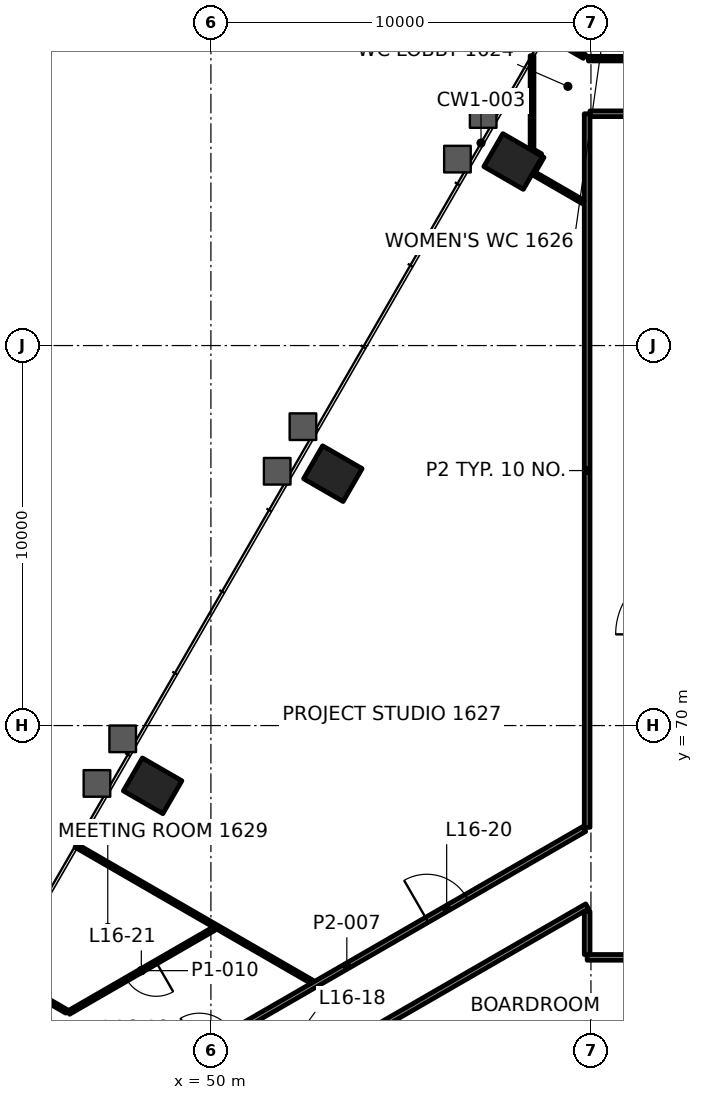
"""IFC4 building model, lengths in metres.
Left out: names, types, materials, properties, quantities, classifications, styles, units other than length and angle.
Written with IfcOpenShell. Run it as: python <this file> out.ifc"""

import sys

from ifc_helpers import new_model, si_unit, direction, frame, frame_2d, origin, origin_2d, place, context, subcontext, project, spatial, rectangle, extrude, element, fill, save


model = new_model("IFC4")
c1 = context("Model", 3, precision=1e-05, world=origin(), true_north=direction((0.0, 1.0)))
c2 = subcontext(c1, "Body", "Model", "MODEL_VIEW")
j1 = project(units=[si_unit("LENGTHUNIT", "METRE"), si_unit("PLANEANGLEUNIT", "RADIAN")], contexts=[c1])
p1 = place(None, origin())
s1 = spatial("IfcSite", under=j1, at=p1, CompositionType="ELEMENT")
p2 = place(p1, origin())
s2 = spatial("IfcBuilding", under=s1, at=p2, CompositionType="ELEMENT")
p3 = place(p2, frame((0.0, 0.0, 73.6)))
s3 = spatial("IfcBuildingStorey", under=s2, at=p3, CompositionType="ELEMENT", Elevation=73.6)
for number, where, z_axis, x_axis in (
    (1, (57.951, 84.843, -0.0), (0.0, 0.0, 1.0), (-0.5, -0.866, 0.0)),
    (2, (53.209, 76.628, -0.0), (0.0, 0.0, 1.0), (-0.5, -0.866, 0.0)),
    (3, (48.466, 68.414, -0.0), (0.0, 0.0, 1.0), (-0.5, -0.866, 0.0)),
):
    element("IfcColumn", number, at=place(p3, frame(where, z_axis=z_axis, x_axis=x_axis)), inside=s3, PredefinedType="COLUMN", context=c2, shape_type="SweptSolid", body=[
        extrude(rectangle(XDim=1.0, YDim=1.2, at=origin_2d()), origin(), (0.0, 0.0, 1.0), 4.2),
    ])
p4 = place(p3, frame((90.099, 63.9, 0.0), z_axis=(0.0, 0.0, 1.0), x_axis=(-1.0, 0.0, 0.0)))
e4 = element("IfcWall", 4, at=p4, inside=s3, PredefinedType="PARTITIONING", context=c2, shape_type="SweptSolid", body=[
    extrude(rectangle(XDim=30.199, YDim=0.15, at=frame_2d((15.1, 0.0))), origin(), (0.0, 0.0, 1.0), 3.4),
])
p5 = place(p4, frame((2.309, 0.0, 0.0)))
e5 = element("IfcOpeningElement", 5, at=p5, cuts=e4, PredefinedType="OPENING", context=c2, shape_type="SweptSolid", body=[
    extrude(rectangle(XDim=1.2, YDim=2.1, at=frame_2d((0.6, 1.05))), frame((0.0, 0.085, 0.0), z_axis=(0.0, -1.0, 0.0), x_axis=(1.0, 0.0, 0.0)), (0.0, 0.0, 1.0), 0.17),
])
p6 = place(p4, frame((14.599, 0.0, 0.0)))
e6 = element("IfcOpeningElement", 6, at=p6, cuts=e4, PredefinedType="OPENING", context=c2, shape_type="SweptSolid", body=[
    extrude(rectangle(XDim=1.0, YDim=2.1, at=frame_2d((0.5, 1.05))), frame((0.0, 0.085, 0.0), z_axis=(0.0, -1.0, 0.0), x_axis=(1.0, 0.0, 0.0)), (0.0, 0.0, 1.0), 0.17),
])
p7 = place(p4, frame((26.791, 0.0, 0.0)))
e7 = element("IfcOpeningElement", 7, at=p7, cuts=e4, PredefinedType="OPENING", context=c2, shape_type="SweptSolid", body=[
    extrude(rectangle(XDim=1.0, YDim=2.1, at=frame_2d((0.5, 1.05))), frame((0.0, 0.085, 0.0), z_axis=(0.0, -1.0, 0.0), x_axis=(1.0, 0.0, 0.0)), (0.0, 0.0, 1.0), 0.17),
])
p8 = place(p3, frame((59.976, 86.1, 0.0), z_axis=(0.0, 0.0, 1.0), x_axis=(1.0, 0.0, 0.0)))
e8 = element("IfcWall", 8, at=p8, inside=s3, PredefinedType="PARTITIONING", context=c2, shape_type="SweptSolid", body=[
    extrude(rectangle(XDim=9.649, YDim=0.15, at=frame_2d((4.825, 0.0))), origin(), (0.0, 0.0, 1.0), 3.4),
])
p9 = place(p8, frame((4.225, 0.0, 0.0)))
e9 = element("IfcOpeningElement", 9, at=p9, cuts=e8, PredefinedType="OPENING", context=c2, shape_type="SweptSolid", body=[
    extrude(rectangle(XDim=1.2, YDim=2.1, at=frame_2d((0.6, 1.05))), frame((0.0, 0.085, 0.0), z_axis=(0.0, -1.0, 0.0), x_axis=(1.0, 0.0, 0.0)), (0.0, 0.0, 1.0), 0.17),
])
p10 = place(p3, frame((67.181, 87.55, 0.0), z_axis=(0.0, 0.0, 1.0), x_axis=(-1.0, 0.0, 0.0)))
e10 = element("IfcWall", 10, at=p10, inside=s3, PredefinedType="PARTITIONING", context=c2, shape_type="SweptSolid", body=[
    extrude(rectangle(XDim=7.249, YDim=0.12, at=frame_2d((3.625, 0.0))), origin(), (0.0, 0.0, 1.0), 3.4),
])
p11 = place(p10, frame((1.388, 0.0, 0.0)))
e11 = element("IfcOpeningElement", 11, at=p11, cuts=e10, PredefinedType="OPENING", context=c2, shape_type="SweptSolid", body=[
    extrude(rectangle(XDim=0.9, YDim=2.1, at=frame_2d((0.45, 1.05))), frame((0.0, 0.07, 0.0), z_axis=(0.0, -1.0, 0.0), x_axis=(1.0, 0.0, 0.0)), (0.0, 0.0, 1.0), 0.14),
])
p12 = place(p10, frame((4.807, 0.0, 0.0)))
e12 = element("IfcOpeningElement", 12, at=p12, cuts=e10, PredefinedType="OPENING", context=c2, shape_type="SweptSolid", body=[
    extrude(rectangle(XDim=0.9, YDim=2.1, at=frame_2d((0.45, 1.05))), frame((0.0, 0.07, 0.0), z_axis=(0.0, -1.0, 0.0), x_axis=(1.0, 0.0, 0.0)), (0.0, 0.0, 1.0), 0.14),
])
p13 = place(p3, frame((59.9, 65.243, 0.0), z_axis=(0.0, 0.0, 1.0), x_axis=(-0.866023326939, -0.500003597184, 0.0)))
e13 = element("IfcWall", 13, at=p13, inside=s3, PredefinedType="PARTITIONING", context=c2, shape_type="SweptSolid", body=[
    extrude(rectangle(XDim=13.48, YDim=0.15, at=frame_2d((6.74, 0.0))), origin(), (0.0, 0.0, 1.0), 3.247),
])
p14 = place(p13, frame((9.643, 0.0, 0.0)))
e14 = element("IfcOpeningElement", 14, at=p14, cuts=e13, PredefinedType="OPENING", context=c2, shape_type="SweptSolid", body=[
    extrude(rectangle(XDim=1.2, YDim=2.1, at=frame_2d((0.6, 1.05))), frame((0.0, 0.085, 0.0), z_axis=(0.0, -1.0, 0.0), x_axis=(1.0, 0.0, 0.0)), (0.0, 0.0, 1.0), 0.17),
])
p15 = place(p3, frame((47.328, 60.063, 0.0), z_axis=(0.0, 0.0, 1.0), x_axis=(0.86602527873, 0.500000216601, 0.0)))
e15 = element("IfcWall", 15, at=p15, inside=s3, PredefinedType="PARTITIONING", context=c2, shape_type="SweptSolid", body=[
    extrude(rectangle(XDim=14.431, YDim=0.15, at=frame_2d((7.215, 0.0))), origin(), (0.0, 0.0, 1.0), 3.4),
])
p16 = place(p15, frame((2.737, 0.0, 0.0)))
e16 = element("IfcOpeningElement", 16, at=p16, cuts=e15, PredefinedType="OPENING", context=c2, shape_type="SweptSolid", body=[
    extrude(rectangle(XDim=1.0, YDim=2.1, at=frame_2d((0.5, 1.05))), frame((0.0, 0.085, 0.0), z_axis=(0.0, -1.0, 0.0), x_axis=(1.0, 0.0, 0.0)), (0.0, 0.0, 1.0), 0.17),
])
p17 = place(p15, frame((9.649, 0.0, 0.0)))
e17 = element("IfcOpeningElement", 17, at=p17, cuts=e15, PredefinedType="OPENING", context=c2, shape_type="SweptSolid", body=[
    extrude(rectangle(XDim=1.2, YDim=2.1, at=frame_2d((0.6, 1.05))), frame((0.0, 0.085, 0.0), z_axis=(0.0, -1.0, 0.0), x_axis=(1.0, 0.0, 0.0)), (0.0, 0.0, 1.0), 0.17),
])
p18 = place(p3, frame((50.082, 64.655, 0.0), z_axis=(0.0, 0.0, 1.0), x_axis=(-0.866030989016, -0.499990325971, 0.0)))
e18 = element("IfcWall", 18, at=p18, inside=s3, PredefinedType="PARTITIONING", context=c2, shape_type="SweptSolid", body=[
    extrude(rectangle(XDim=4.418, YDim=0.1, at=frame_2d((2.209, 0.0))), origin(), (0.0, 0.0, 1.0), 3.4),
])
p19 = place(p18, frame((1.759, 0.0, 0.0)))
e19 = element("IfcOpeningElement", 19, at=p19, cuts=e18, PredefinedType="OPENING", context=c2, shape_type="SweptSolid", body=[
    extrude(rectangle(XDim=0.9, YDim=2.1, at=frame_2d((0.45, 1.05))), frame((0.0, 0.06, 0.0), z_axis=(0.0, -1.0, 0.0), x_axis=(1.0, 0.0, 0.0)), (0.0, 0.0, 1.0), 0.12),
])
p20 = place(p3, frame((58.496, 84.587, 0.0), z_axis=(0.0, 0.0, 1.0), x_axis=(0.500114568548, 0.865959247497, 0.0)))
e20 = element("IfcWall", 20, at=p20, inside=s3, PredefinedType="PARTITIONING", context=c2, shape_type="SweptSolid", body=[
    extrude(rectangle(XDim=0.449, YDim=0.1, at=frame_2d((0.225, 0.0))), origin(), (0.0, 0.0, 1.0), 3.4),
])
p21 = place(p3, frame((59.9, 63.975, 0.0), z_axis=(0.0, 0.0, 1.0), x_axis=(0.0, 1.0, 0.0)))
e21 = element("IfcWall", 21, at=p21, inside=s3, PredefinedType="PARTITIONING", context=c2, shape_type="SweptSolid", body=[
    extrude(rectangle(XDim=1.131, YDim=0.15, at=frame_2d((0.565, 0.0))), origin(), (0.0, 0.0, 1.0), 3.247),
])
p22 = place(p3, frame((59.9, 67.321, 0.0), z_axis=(0.0, 0.0, 1.0), x_axis=(0.0, 1.0, 0.0)))
e22 = element("IfcWall", 22, at=p22, inside=s3, PredefinedType="PARTITIONING", context=c2, shape_type="SweptSolid", body=[
    extrude(rectangle(XDim=18.778, YDim=0.15, at=frame_2d((9.389, 0.0))), origin(), (0.0, 0.0, 1.0), 3.4),
])
p23 = place(p3, frame((58.45, 85.133, 0.0), z_axis=(0.0, 0.0, 1.0), x_axis=(0.0, 1.0, 0.0)))
e23 = element("IfcWall", 23, at=p23, inside=s3, PredefinedType="PARTITIONING", context=c2, shape_type="SweptSolid", body=[
    extrude(rectangle(XDim=2.494, YDim=0.1, at=frame_2d((1.247, 0.0))), origin(), (0.0, 0.0, 1.0), 3.165),
])
p24 = place(p3, frame((69.573, 86.348, 0.0), z_axis=(0.0, 0.0, 1.0), x_axis=(-0.866024495625, 0.500001572974, 0.0)))
e24 = element("IfcWall", 24, at=p24, inside=s3, PredefinedType="PARTITIONING", context=c2, shape_type="SweptSolid", body=[
    extrude(rectangle(XDim=10.272, YDim=0.2, at=frame_2d((5.136, 0.0))), origin(), (0.0, 0.0, 1.0), 3.165),
])
p25 = place(p3, frame((63.512, 87.665, 0.0), z_axis=(0.0, 0.0, 1.0), x_axis=(-0.866014185868, 0.500019429497, 0.0)))
e25 = element("IfcWall", 25, at=p25, inside=s3, PredefinedType="PARTITIONING", context=c2, shape_type="SweptSolid", body=[
    extrude(rectangle(XDim=4.365, YDim=0.12, at=frame_2d((2.182, 0.0))), origin(), (0.0, 0.0, 1.0), 3.165),
])
p26 = place(p3, frame((59.828, 87.61, 0.0), z_axis=(0.0, 0.0, 1.0), x_axis=(-0.865996090227, 0.500050769134, 0.0)))
e26 = element("IfcWall", 26, at=p26, inside=s3, PredefinedType="PARTITIONING", context=c2, shape_type="SweptSolid", body=[
    extrude(rectangle(XDim=1.202, YDim=0.12, at=frame_2d((0.601, 0.0))), origin(), (0.0, 0.0, 1.0), 3.165),
])
p27 = place(p3, frame((58.677, 85.001, 0.0), z_axis=(0.0, 0.0, 1.0), x_axis=(-0.86610613113, 0.49986015006, 0.0)))
e27 = element("IfcWall", 27, at=p27, inside=s3, PredefinedType="PARTITIONING", context=c2, shape_type="SweptSolid", body=[
    extrude(rectangle(XDim=0.205, YDim=0.1, at=frame_2d((0.102, 0.0))), origin(), (0.0, 0.0, 1.0), 3.4),
])
p28 = place(p3, frame((59.799, 83.776, 0.0), z_axis=(0.0, 0.0, 1.0), x_axis=(-0.866029087811, 0.499993619025, 0.0)))
e28 = element("IfcWall", 28, at=p28, inside=s3, PredefinedType="PARTITIONING", context=c2, shape_type="SweptSolid", body=[
    extrude(rectangle(XDim=1.533, YDim=0.1, at=frame_2d((0.766, 0.0))), origin(), (0.0, 0.0, 1.0), 3.4),
])
p29 = place(p3, frame((52.657, 63.256, 0.0), z_axis=(0.0, 0.0, 1.0), x_axis=(-0.866014863173, 0.50001825643, 0.0)))
e29 = element("IfcWall", 29, at=p29, inside=s3, PredefinedType="PARTITIONING", context=c2, shape_type="SweptSolid", body=[
    extrude(rectangle(XDim=7.168, YDim=0.1, at=frame_2d((3.584, 0.0))), origin(), (0.0, 0.0, 1.0), 3.4),
])
p30 = place(p3, frame((46.206, 62.475, 0.0), z_axis=(0.0, 0.0, 1.0), x_axis=(-0.866033041146, 0.499986771468, 0.0)))
e30 = element("IfcWall", 30, at=p30, inside=s3, PredefinedType="PARTITIONING", context=c2, shape_type="SweptSolid", body=[
    extrude(rectangle(XDim=1.972, YDim=0.1, at=frame_2d((0.986, 0.0))), origin(), (0.0, 0.0, 1.0), 3.4),
])
p31 = place(p17, origin())
e31 = element("IfcDoor", 31, at=p31, inside=s3, OperationType="DOUBLE_DOOR_SINGLE_SWING", PredefinedType="DOOR", context=c2, shape_type="SweptSolid", body=[
    extrude(rectangle(XDim=1.2, YDim=2.1, at=frame_2d((0.6, 1.05))), frame((0.0, 0.025, 0.0), z_axis=(0.0, -1.0, 0.0), x_axis=(1.0, 0.0, 0.0)), (0.0, 0.0, 1.0), 0.05),
])
fill(e17, e31)
p32 = place(p19, origin())
e32 = element("IfcDoor", 32, at=p32, inside=s3, OperationType="SINGLE_SWING_LEFT", PredefinedType="DOOR", context=c2, shape_type="SweptSolid", body=[
    extrude(rectangle(XDim=0.9, YDim=2.1, at=frame_2d((0.45, 1.05))), frame((0.0, 0.025, 0.0), z_axis=(0.0, -1.0, 0.0), x_axis=(1.0, 0.0, 0.0)), (0.0, 0.0, 1.0), 0.05),
])
fill(e19, e32)
save(model, sys.argv[1])
